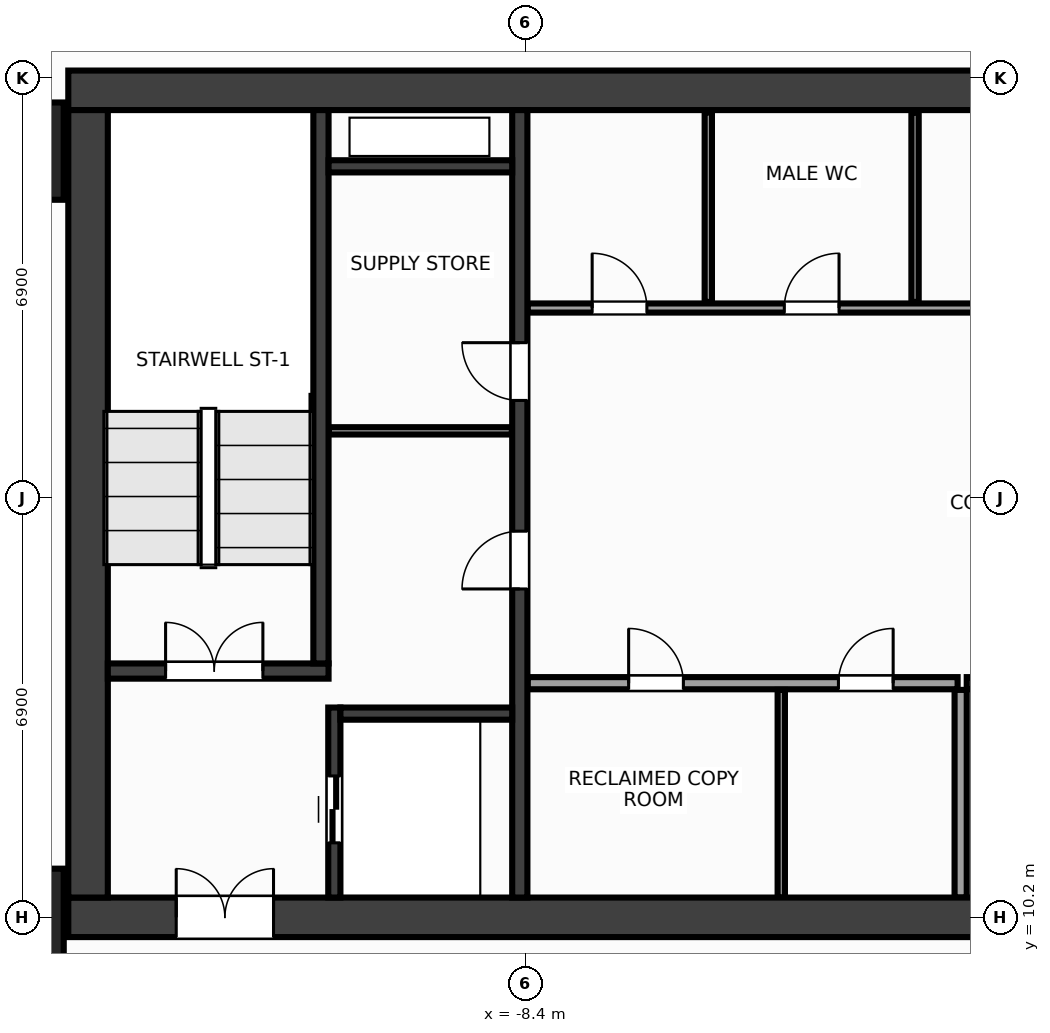
"""IFC4 building model, lengths in metres.
Left out: names, types, materials, properties, quantities, classifications, styles, units other than length and angle.
Written with IfcOpenShell. Run it as: python <this file> out.ifc"""

import sys

from ifc_helpers import new_model, si_unit, direction, frame, frame_2d, origin, origin_2d, place, context, subcontext, project, spatial, rectangle, extrude, source, transform, mapped, element, fill, save


model = new_model("IFC4")
c1 = context("Model", 3, precision=1e-05, world=origin(), true_north=direction((0.0, 1.0)))
c2 = subcontext(c1, "Body", "Model", "MODEL_VIEW")
j1 = project(units=[si_unit("LENGTHUNIT", "METRE"), si_unit("PLANEANGLEUNIT", "RADIAN")], contexts=[c1])
p1 = place(None, origin())
s1 = spatial("IfcSite", under=j1, at=p1, CompositionType="ELEMENT")
p2 = place(p1, origin())
s2 = spatial("IfcBuilding", under=s1, at=p2, CompositionType="ELEMENT")
p3 = place(p2, frame((0.0, 0.0, 113.6)))
s3 = spatial("IfcBuildingStorey", under=s2, at=p3, CompositionType="ELEMENT", Elevation=113.6)
m1 = source(origin(), c2, "Body", "SweptSolid", [
    extrude(rectangle(XDim=31.85, YDim=0.65, at=frame_2d((15.925, 0.0))), origin(), (0.0, 0.0, 1.0), 3.6),
])
p4 = place(p3, frame((-15.925, 23.8, 0.0), z_axis=(0.0, 0.0, 1.0), x_axis=(1.0, 0.0, 0.0)))
e1 = element("IfcWall", 1, at=p4, inside=s3, PredefinedType="SHEAR", context=c2, shape_type="MappedRepresentation", body=[
    mapped(m1, transform((0.0, 0.0, 0.0), x_axis=(1.0, 0.0, 0.0), y_axis=(0.0, 1.0, 0.0), z_axis=(0.0, 0.0, 1.0), scale=1.0)),
])
p5 = place(p3, frame((-15.925, 10.2, 0.0), z_axis=(0.0, 0.0, 1.0), x_axis=(1.0, 0.0, 0.0)))
e2 = element("IfcWall", 2, at=p5, inside=s3, PredefinedType="SHEAR", context=c2, shape_type="MappedRepresentation", body=[
    mapped(m1, transform((0.0, 0.0, 0.0), x_axis=(1.0, 0.0, 0.0), y_axis=(0.0, 1.0, 0.0), z_axis=(0.0, 0.0, 1.0), scale=1.0)),
])
p6 = place(p5, frame((1.775, 0.0, 0.0)))
e3 = element("IfcOpeningElement", 3, at=p6, cuts=e2, PredefinedType="OPENING", context=c2, shape_type="SweptSolid", body=[
    extrude(rectangle(XDim=1.6, YDim=2.15, at=frame_2d((0.8, 1.075))), frame((0.0, 0.337, 0.0), z_axis=(0.0, -1.0, 0.0), x_axis=(1.0, 0.0, 0.0)), (0.0, 0.0, 1.0), 0.674),
])
p7 = place(p5, frame((28.475, 0.0, 0.0)))
e4 = element("IfcOpeningElement", 4, at=p7, cuts=e2, PredefinedType="OPENING", context=c2, shape_type="SweptSolid", body=[
    extrude(rectangle(XDim=1.6, YDim=2.15, at=frame_2d((0.8, 1.075))), frame((0.0, 0.337, 0.0), z_axis=(0.0, -1.0, 0.0), x_axis=(1.0, 0.0, 0.0)), (0.0, 0.0, 1.0), 0.674),
])
p8 = place(p5, frame((15.175, 0.0, 0.0)))
e5 = element("IfcOpeningElement", 5, at=p8, cuts=e2, PredefinedType="OPENING", context=c2, shape_type="SweptSolid", body=[
    extrude(rectangle(XDim=1.5, YDim=2.2, at=frame_2d((0.75, 1.1))), frame((0.0, 0.337, 0.0), z_axis=(0.0, -1.0, 0.0), x_axis=(1.0, 0.0, 0.0)), (0.0, 0.0, 1.0), 0.674),
])
m2 = source(origin(), c2, "Body", "SweptSolid", [
    extrude(rectangle(XDim=12.95, YDim=0.65, at=frame_2d((6.475, 0.0))), origin(), (0.0, 0.0, 1.0), 3.6),
])
p9 = place(p3, frame((-15.6, 10.525, 0.0), z_axis=(0.0, 0.0, 1.0), x_axis=(0.0, 1.0, 0.0)))
e6 = element("IfcWall", 6, at=p9, inside=s3, PredefinedType="SHEAR", context=c2, shape_type="MappedRepresentation", body=[
    mapped(m2, transform((0.0, 0.0, 0.0), x_axis=(1.0, 0.0, 0.0), y_axis=(0.0, 1.0, 0.0), z_axis=(0.0, 0.0, 1.0), scale=1.0)),
])
m3 = source(origin(), c2, "Body", "SweptSolid", [
    extrude(rectangle(XDim=12.95, YDim=0.25, at=frame_2d((6.475, 0.0))), origin(), (0.0, 0.0, 1.0), 3.6),
])
p10 = place(p3, frame((-8.5, 10.525, 0.0), z_axis=(0.0, 0.0, 1.0), x_axis=(0.0, 1.0, 0.0)))
e7 = element("IfcWall", 7, at=p10, inside=s3, PredefinedType="SHEAR", context=c2, shape_type="MappedRepresentation", body=[
    mapped(m3, transform((0.0, 0.0, 0.0), x_axis=(1.0, 0.0, 0.0), y_axis=(0.0, 1.0, 0.0), z_axis=(0.0, 0.0, 1.0), scale=1.0)),
])
p11 = place(p10, frame((5.075, 0.0, 0.0)))
e8 = element("IfcOpeningElement", 8, at=p11, cuts=e7, PredefinedType="OPENING", context=c2, shape_type="SweptSolid", body=[
    extrude(rectangle(XDim=0.95, YDim=2.15, at=frame_2d((0.475, 1.075))), frame((0.0, 0.137, 0.0), z_axis=(0.0, -1.0, 0.0), x_axis=(1.0, 0.0, 0.0)), (0.0, 0.0, 1.0), 0.274),
])
p12 = place(p10, frame((8.175, 0.0, 0.0)))
e9 = element("IfcOpeningElement", 9, at=p12, cuts=e7, PredefinedType="OPENING", context=c2, shape_type="SweptSolid", body=[
    extrude(rectangle(XDim=0.95, YDim=2.15, at=frame_2d((0.475, 1.075))), frame((0.0, 0.137, 0.0), z_axis=(0.0, -1.0, 0.0), x_axis=(1.0, 0.0, 0.0)), (0.0, 0.0, 1.0), 0.274),
])
m4 = source(origin(), c2, "Body", "SweptSolid", [
    extrude(rectangle(XDim=3.63, YDim=0.25, at=frame_2d((1.815, 0.0))), origin(), (0.0, 0.0, 1.0), 3.6),
])
p13 = place(p3, frame((-15.275, 14.25, 0.0), z_axis=(0.0, 0.0, 1.0), x_axis=(1.0, 0.0, 0.0)))
e10 = element("IfcWall", 10, at=p13, inside=s3, PredefinedType="SHEAR", context=c2, shape_type="MappedRepresentation", body=[
    mapped(m4, transform((0.0, 0.0, 0.0), x_axis=(1.0, 0.0, 0.0), y_axis=(0.0, 1.0, 0.0), z_axis=(0.0, 0.0, 1.0), scale=1.0)),
])
p14 = place(p13, frame((0.95, 0.0, 0.0)))
e11 = element("IfcOpeningElement", 11, at=p14, cuts=e10, PredefinedType="OPENING", context=c2, shape_type="SweptSolid", body=[
    extrude(rectangle(XDim=1.6, YDim=2.15, at=frame_2d((0.8, 1.075))), frame((0.0, 0.137, 0.0), z_axis=(0.0, -1.0, 0.0), x_axis=(1.0, 0.0, 0.0)), (0.0, 0.0, 1.0), 0.274),
])
m5 = source(origin(), c2, "Body", "SweptSolid", [
    extrude(rectangle(XDim=9.1, YDim=0.25, at=frame_2d((4.55, 0.0))), origin(), (0.0, 0.0, 1.0), 3.6),
])
p15 = place(p3, frame((-11.77, 14.375, 0.0), z_axis=(0.0, 0.0, 1.0), x_axis=(0.0, 1.0, 0.0)))
e12 = element("IfcWall", 12, at=p15, inside=s3, PredefinedType="SHEAR", context=c2, shape_type="MappedRepresentation", body=[
    mapped(m5, transform((0.0, 0.0, 0.0), x_axis=(1.0, 0.0, 0.0), y_axis=(0.0, 1.0, 0.0), z_axis=(0.0, 0.0, 1.0), scale=1.0)),
])
m6 = source(origin(), c2, "Body", "SweptSolid", [
    extrude(rectangle(XDim=3.125, YDim=0.2, at=frame_2d((1.562, 0.0))), origin(), (0.0, 0.0, 1.0), 3.6),
])
p16 = place(p3, frame((-11.55, 10.525, 0.0), z_axis=(0.0, 0.0, 1.0), x_axis=(0.0, 1.0, 0.0)))
e13 = element("IfcWall", 13, at=p16, inside=s3, PredefinedType="SHEAR", context=c2, shape_type="MappedRepresentation", body=[
    mapped(m6, transform((0.0, 0.0, 0.0), x_axis=(1.0, 0.0, 0.0), y_axis=(0.0, 1.0, 0.0), z_axis=(0.0, 0.0, 1.0), scale=1.0)),
])
p17 = place(p16, frame((0.9, 0.0, 0.0)))
e14 = element("IfcOpeningElement", 14, at=p17, cuts=e13, PredefinedType="OPENING", context=c2, shape_type="SweptSolid", body=[
    extrude(rectangle(XDim=1.1, YDim=2.15, at=frame_2d((0.55, 1.075))), frame((0.0, 0.112, 0.0), z_axis=(0.0, -1.0, 0.0), x_axis=(1.0, 0.0, 0.0)), (0.0, 0.0, 1.0), 0.224),
])
m7 = source(origin(), c2, "Body", "SweptSolid", [
    extrude(rectangle(XDim=2.825, YDim=0.2, at=frame_2d((1.413, 0.0))), origin(), (0.0, 0.0, 1.0), 3.6),
])
p18 = place(p3, frame((-11.45, 13.55, 0.0), z_axis=(0.0, 0.0, 1.0), x_axis=(1.0, 0.0, 0.0)))
e15 = element("IfcWall", 15, at=p18, inside=s3, PredefinedType="SHEAR", context=c2, shape_type="MappedRepresentation", body=[
    mapped(m7, transform((0.0, 0.0, 0.0), x_axis=(1.0, 0.0, 0.0), y_axis=(0.0, 1.0, 0.0), z_axis=(0.0, 0.0, 1.0), scale=1.0)),
])
m8 = source(origin(), c2, "Body", "SweptSolid", [
    extrude(rectangle(XDim=3.02, YDim=0.2, at=frame_2d((1.51, 0.0))), origin(), (0.0, 0.0, 1.0), 3.6),
])
p19 = place(p3, frame((-11.645, 22.55, 0.0), z_axis=(0.0, 0.0, 1.0), x_axis=(1.0, 0.0, 0.0)))
e16 = element("IfcWall", 16, at=p19, inside=s3, PredefinedType="SHEAR", context=c2, shape_type="MappedRepresentation", body=[
    mapped(m8, transform((0.0, 0.0, 0.0), x_axis=(1.0, 0.0, 0.0), y_axis=(0.0, 1.0, 0.0), z_axis=(0.0, 0.0, 1.0), scale=1.0)),
])
m9 = source(origin(), c2, "Body", "SweptSolid", [
    extrude(rectangle(XDim=1.6, YDim=1.6, at=origin_2d()), origin(), (0.0, 0.0, 1.0), 3.6),
])
for number, where, z_axis, x_axis in (
    (17, (-16.8, 10.2, 0.0), (0.0, 0.0, 1.0), (1.0, 0.0, 0.0)),
    (18, (-16.8, 22.8, 0.0), (0.0, 0.0, 1.0), (1.0, 0.0, 0.0)),
):
    element("IfcColumn", number, at=place(p3, frame(where, z_axis=z_axis, x_axis=x_axis)), inside=s3, PredefinedType="COLUMN", context=c2, shape_type="MappedRepresentation", body=[
        mapped(m9, transform((0.0, 0.0, 0.0), x_axis=(1.0, 0.0, 0.0), y_axis=(0.0, 1.0, 0.0), z_axis=(0.0, 0.0, 1.0), scale=1.0)),
    ])
m10 = source(origin(), c2, "Body", "SweptSolid", [
    extrude(rectangle(XDim=3.01, YDim=0.12, at=frame_2d((1.505, 0.0))), origin(), (0.0, 0.0, 1.0), 3.36),
])
p20 = place(p3, frame((-11.64, 18.2, 0.0), z_axis=(0.0, 0.0, 1.0), x_axis=(1.0, 0.0, 0.0)))
e19 = element("IfcWall", 19, at=p20, inside=s3, PredefinedType="PARTITIONING", context=c2, shape_type="MappedRepresentation", body=[
    mapped(m10, transform((0.0, 0.0, 0.0), x_axis=(1.0, 0.0, 0.0), y_axis=(0.0, 1.0, 0.0), z_axis=(0.0, 0.0, 1.0), scale=1.0)),
])
m11 = source(origin(), c2, "Body", "SweptSolid", [
    extrude(rectangle(XDim=7.07, YDim=0.2, at=frame_2d((3.535, 0.0))), origin(), (0.0, 0.0, 1.0), 3.36),
])
p21 = place(p3, frame((-8.37, 14.05, 0.0), z_axis=(0.0, 0.0, 1.0), x_axis=(1.0, 0.0, 0.0)))
e20 = element("IfcWall", 20, at=p21, inside=s3, PredefinedType="PARTITIONING", context=c2, shape_type="MappedRepresentation", body=[
    mapped(m11, transform((0.0, 0.0, 0.0), x_axis=(1.0, 0.0, 0.0), y_axis=(0.0, 1.0, 0.0), z_axis=(0.0, 0.0, 1.0), scale=1.0)),
])
p22 = place(p21, frame((1.66, 0.0, 0.0)))
e21 = element("IfcOpeningElement", 21, at=p22, cuts=e20, PredefinedType="OPENING", context=c2, shape_type="SweptSolid", body=[
    extrude(rectangle(XDim=0.9, YDim=2.15, at=frame_2d((0.45, 1.075))), frame((0.0, 0.112, 0.0), z_axis=(0.0, -1.0, 0.0), x_axis=(1.0, 0.0, 0.0)), (0.0, 0.0, 1.0), 0.224),
])
p23 = place(p21, frame((5.11, 0.0, 0.0)))
e22 = element("IfcOpeningElement", 22, at=p23, cuts=e20, PredefinedType="OPENING", context=c2, shape_type="SweptSolid", body=[
    extrude(rectangle(XDim=0.9, YDim=2.15, at=frame_2d((0.45, 1.075))), frame((0.0, 0.112, 0.0), z_axis=(0.0, -1.0, 0.0), x_axis=(1.0, 0.0, 0.0)), (0.0, 0.0, 1.0), 0.224),
])
m12 = source(origin(), c2, "Body", "SweptSolid", [
    extrude(rectangle(XDim=3.415, YDim=0.2, at=frame_2d((1.708, 0.0))), origin(), (0.0, 0.0, 1.0), 3.36),
])
p24 = place(p3, frame((-1.25, 10.525, 0.0), z_axis=(0.0, 0.0, 1.0), x_axis=(0.0, 1.0, 0.0)))
e23 = element("IfcWall", 23, at=p24, inside=s3, PredefinedType="PARTITIONING", context=c2, shape_type="MappedRepresentation", body=[
    mapped(m12, transform((0.0, 0.0, 0.0), x_axis=(1.0, 0.0, 0.0), y_axis=(0.0, 1.0, 0.0), z_axis=(0.0, 0.0, 1.0), scale=1.0)),
])
m13 = source(origin(), c2, "Body", "SweptSolid", [
    extrude(rectangle(XDim=2.3, YDim=0.2, at=frame_2d((1.15, 0.0))), origin(), (0.0, 0.0, 1.0), 3.36),
])
p25 = place(p3, frame((-1.15, 14.05, 0.0), z_axis=(0.0, 0.0, 1.0), x_axis=(1.0, 0.0, 0.0)))
e24 = element("IfcWall", 24, at=p25, inside=s3, PredefinedType="PARTITIONING", context=c2, shape_type="MappedRepresentation", body=[
    mapped(m13, transform((0.0, 0.0, 0.0), x_axis=(1.0, 0.0, 0.0), y_axis=(0.0, 1.0, 0.0), z_axis=(0.0, 0.0, 1.0), scale=1.0)),
])
p26 = place(p25, frame((0.4, 0.0, 0.0)))
e25 = element("IfcOpeningElement", 25, at=p26, cuts=e24, PredefinedType="OPENING", context=c2, shape_type="SweptSolid", body=[
    extrude(rectangle(XDim=1.5, YDim=2.2, at=frame_2d((0.75, 1.1))), frame((0.0, 0.112, 0.0), z_axis=(0.0, -1.0, 0.0), x_axis=(1.0, 0.0, 0.0)), (0.0, 0.0, 1.0), 0.224),
])
m14 = source(origin(), c2, "Body", "SweptSolid", [
    extrude(rectangle(XDim=14.59, YDim=0.15, at=frame_2d((7.295, 0.0))), origin(), (0.0, 0.0, 1.0), 3.36),
])
p27 = place(p3, frame((-8.37, 20.22, 0.0), z_axis=(0.0, 0.0, 1.0), x_axis=(1.0, 0.0, 0.0)))
e26 = element("IfcWall", 26, at=p27, inside=s3, PredefinedType="PARTITIONING", context=c2, shape_type="MappedRepresentation", body=[
    mapped(m14, transform((0.0, 0.0, 0.0), x_axis=(1.0, 0.0, 0.0), y_axis=(0.0, 1.0, 0.0), z_axis=(0.0, 0.0, 1.0), scale=1.0)),
])
p28 = place(p27, frame((1.06, 0.0, 0.0)))
e27 = element("IfcOpeningElement", 27, at=p28, cuts=e26, PredefinedType="OPENING", context=c2, shape_type="SweptSolid", body=[
    extrude(rectangle(XDim=0.9, YDim=2.15, at=frame_2d((0.45, 1.075))), frame((0.0, 0.087, 0.0), z_axis=(0.0, -1.0, 0.0), x_axis=(1.0, 0.0, 0.0)), (0.0, 0.0, 1.0), 0.174),
])
p29 = place(p27, frame((4.22, 0.0, 0.0)))
e28 = element("IfcOpeningElement", 28, at=p29, cuts=e26, PredefinedType="OPENING", context=c2, shape_type="SweptSolid", body=[
    extrude(rectangle(XDim=0.9, YDim=2.15, at=frame_2d((0.45, 1.075))), frame((0.0, 0.087, 0.0), z_axis=(0.0, -1.0, 0.0), x_axis=(1.0, 0.0, 0.0)), (0.0, 0.0, 1.0), 0.174),
])
p30 = place(p27, frame((7.82, 0.0, 0.0)))
e29 = element("IfcOpeningElement", 29, at=p30, cuts=e26, PredefinedType="OPENING", context=c2, shape_type="SweptSolid", body=[
    extrude(rectangle(XDim=0.9, YDim=2.15, at=frame_2d((0.45, 1.075))), frame((0.0, 0.087, 0.0), z_axis=(0.0, -1.0, 0.0), x_axis=(1.0, 0.0, 0.0)), (0.0, 0.0, 1.0), 0.174),
])
p31 = place(p27, frame((11.87, 0.0, 0.0)))
e30 = element("IfcOpeningElement", 30, at=p31, cuts=e26, PredefinedType="OPENING", context=c2, shape_type="SweptSolid", body=[
    extrude(rectangle(XDim=0.9, YDim=2.15, at=frame_2d((0.45, 1.075))), frame((0.0, 0.087, 0.0), z_axis=(0.0, -1.0, 0.0), x_axis=(1.0, 0.0, 0.0)), (0.0, 0.0, 1.0), 0.174),
])
m15 = source(origin(), c2, "Body", "SweptSolid", [
    extrude(rectangle(XDim=3.415, YDim=0.12, at=frame_2d((1.708, 0.0))), origin(), (0.0, 0.0, 1.0), 3.36),
])
p32 = place(p3, frame((-4.2, 10.525, 0.0), z_axis=(0.0, 0.0, 1.0), x_axis=(0.0, 1.0, 0.0)))
e31 = element("IfcWall", 31, at=p32, inside=s3, PredefinedType="PARTITIONING", context=c2, shape_type="MappedRepresentation", body=[
    mapped(m15, transform((0.0, 0.0, 0.0), x_axis=(1.0, 0.0, 0.0), y_axis=(0.0, 1.0, 0.0), z_axis=(0.0, 0.0, 1.0), scale=1.0)),
])
m16 = source(origin(), c2, "Body", "SweptSolid", [
    extrude(rectangle(XDim=3.115, YDim=0.12, at=frame_2d((1.558, 0.0))), origin(), (0.0, 0.0, 1.0), 3.36),
])
for number, where, z_axis, x_axis in (
    (32, (-5.4, 20.32, 0.0), (0.0, 0.0, 1.0), (0.0, 1.0, 0.0)),
    (33, (-2.0, 20.32, 0.0), (0.0, 0.0, 1.0), (0.0, 1.0, 0.0)),
):
    element("IfcWall", number, at=place(p3, frame(where, z_axis=z_axis, x_axis=x_axis)), inside=s3, PredefinedType="PARTITIONING", context=c2, shape_type="MappedRepresentation", body=[
        mapped(m16, transform((0.0, 0.0, 0.0), x_axis=(1.0, 0.0, 0.0), y_axis=(0.0, 1.0, 0.0), z_axis=(0.0, 0.0, 1.0), scale=1.0)),
    ])
m17 = source(origin(), c2, "Body", "SweptSolid", [
    extrude(rectangle(XDim=1.6, YDim=2.15, at=frame_2d((0.8, 1.075))), frame((0.0, 0.025, 0.0), z_axis=(0.0, -1.0, 0.0), x_axis=(1.0, 0.0, 0.0)), (0.0, 0.0, 1.0), 0.05),
])
p33 = place(p14, origin())
e34 = element("IfcDoor", 34, at=p33, inside=s3, OperationType="DOUBLE_DOOR_SINGLE_SWING", PredefinedType="DOOR", context=c2, shape_type="MappedRepresentation", body=[
    mapped(m17, transform((0.0, 0.0, 0.0), x_axis=(1.0, 0.0, 0.0), y_axis=(0.0, 1.0, 0.0), z_axis=(0.0, 0.0, 1.0), scale=1.0)),
])
fill(e11, e34)
p34 = place(p6, origin())
e35 = element("IfcDoor", 35, at=p34, inside=s3, OperationType="DOUBLE_DOOR_SINGLE_SWING", PredefinedType="DOOR", context=c2, shape_type="MappedRepresentation", body=[
    mapped(m17, transform((0.0, 0.0, 0.0), x_axis=(1.0, 0.0, 0.0), y_axis=(0.0, 1.0, 0.0), z_axis=(0.0, 0.0, 1.0), scale=1.0)),
])
fill(e3, e35)
m18 = source(origin(), c2, "Body", "SweptSolid", [
    extrude(rectangle(XDim=1.1, YDim=2.15, at=frame_2d((0.55, 1.075))), frame((0.0, 0.025, 0.0), z_axis=(0.0, -1.0, 0.0), x_axis=(1.0, 0.0, 0.0)), (0.0, 0.0, 1.0), 0.05),
])
p35 = place(p17, origin())
e36 = element("IfcDoor", 36, at=p35, inside=s3, OperationType="DOUBLE_DOOR_SLIDING", PredefinedType="DOOR", context=c2, shape_type="MappedRepresentation", body=[
    mapped(m18, transform((0.0, 0.0, 0.0), x_axis=(1.0, 0.0, 0.0), y_axis=(0.0, 1.0, 0.0), z_axis=(0.0, 0.0, 1.0), scale=1.0)),
])
fill(e14, e36)
m19 = source(origin(), c2, "Body", "SweptSolid", [
    extrude(rectangle(XDim=0.95, YDim=2.15, at=frame_2d((0.475, 1.075))), frame((0.0, 0.025, 0.0), z_axis=(0.0, -1.0, 0.0), x_axis=(1.0, 0.0, 0.0)), (0.0, 0.0, 1.0), 0.05),
])
p36 = place(p11, origin())
e37 = element("IfcDoor", 37, at=p36, inside=s3, OperationType="SINGLE_SWING_LEFT", PredefinedType="DOOR", context=c2, shape_type="MappedRepresentation", body=[
    mapped(m19, transform((0.0, 0.0, 0.0), x_axis=(1.0, 0.0, 0.0), y_axis=(0.0, 1.0, 0.0), z_axis=(0.0, 0.0, 1.0), scale=1.0)),
])
fill(e8, e37)
p37 = place(p12, origin())
e38 = element("IfcDoor", 38, at=p37, inside=s3, OperationType="SINGLE_SWING_RIGHT", PredefinedType="DOOR", context=c2, shape_type="MappedRepresentation", body=[
    mapped(m19, transform((0.0, 0.0, 0.0), x_axis=(1.0, 0.0, 0.0), y_axis=(0.0, 1.0, 0.0), z_axis=(0.0, 0.0, 1.0), scale=1.0)),
])
fill(e9, e38)
m20 = source(origin(), c2, "Body", "SweptSolid", [
    extrude(rectangle(XDim=0.9, YDim=2.15, at=frame_2d((0.45, 1.075))), frame((0.0, 0.025, 0.0), z_axis=(0.0, -1.0, 0.0), x_axis=(1.0, 0.0, 0.0)), (0.0, 0.0, 1.0), 0.05),
])
p38 = place(p22, origin())
e39 = element("IfcDoor", 39, at=p38, inside=s3, OperationType="SINGLE_SWING_LEFT", PredefinedType="DOOR", context=c2, shape_type="MappedRepresentation", body=[
    mapped(m20, transform((0.0, 0.0, 0.0), x_axis=(1.0, 0.0, 0.0), y_axis=(0.0, 1.0, 0.0), z_axis=(0.0, 0.0, 1.0), scale=1.0)),
])
fill(e21, e39)
p39 = place(p23, origin())
e40 = element("IfcDoor", 40, at=p39, inside=s3, OperationType="SINGLE_SWING_RIGHT", PredefinedType="DOOR", context=c2, shape_type="MappedRepresentation", body=[
    mapped(m20, transform((0.0, 0.0, 0.0), x_axis=(1.0, 0.0, 0.0), y_axis=(0.0, 1.0, 0.0), z_axis=(0.0, 0.0, 1.0), scale=1.0)),
])
fill(e22, e40)
p40 = place(p28, origin())
e41 = element("IfcDoor", 41, at=p40, inside=s3, OperationType="SINGLE_SWING_LEFT", PredefinedType="DOOR", context=c2, shape_type="MappedRepresentation", body=[
    mapped(m20, transform((0.0, 0.0, 0.0), x_axis=(1.0, 0.0, 0.0), y_axis=(0.0, 1.0, 0.0), z_axis=(0.0, 0.0, 1.0), scale=1.0)),
])
fill(e27, e41)
p41 = place(p29, origin())
e42 = element("IfcDoor", 42, at=p41, inside=s3, OperationType="SINGLE_SWING_RIGHT", PredefinedType="DOOR", context=c2, shape_type="MappedRepresentation", body=[
    mapped(m20, transform((0.0, 0.0, 0.0), x_axis=(1.0, 0.0, 0.0), y_axis=(0.0, 1.0, 0.0), z_axis=(0.0, 0.0, 1.0), scale=1.0)),
])
fill(e28, e42)
save(model, sys.argv[1])
